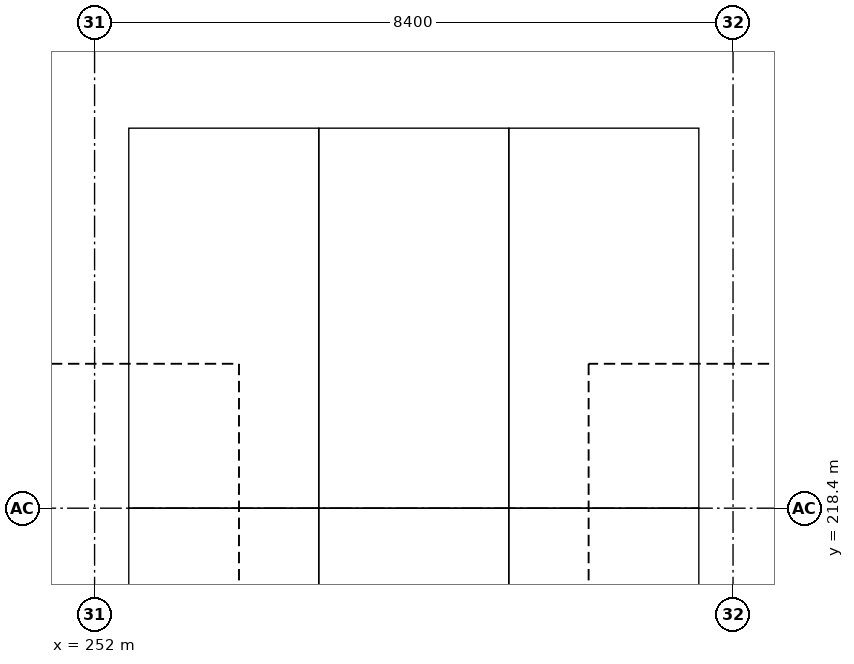
"""IFC4 building model, lengths in metres.
Left out: names, types, materials, properties, quantities, classifications, styles, units other than length and angle.
Written with IfcOpenShell. Run it as: python <this file> out.ifc"""

import sys

from ifc_helpers import new_model, si_unit, direction, frame, origin, origin_2d, place, context, subcontext, project, spatial, rectangle, extrude, element, save


model = new_model("IFC4")
c1 = context("Model", 3, precision=1e-05, world=origin(), true_north=direction((0.0, 1.0)))
c2 = subcontext(c1, "Body", "Model", "MODEL_VIEW")
j1 = project(units=[si_unit("LENGTHUNIT", "METRE"), si_unit("PLANEANGLEUNIT", "RADIAN")], contexts=[c1])
p1 = place(None, origin())
s1 = spatial("IfcSite", under=j1, at=p1, CompositionType="ELEMENT")
p2 = place(p1, origin())
s2 = spatial("IfcBuilding", under=s1, at=p2, CompositionType="ELEMENT")
p3 = place(p2, frame((0.0, 0.0, -3.0)))
s3 = spatial("IfcBuildingStorey", under=s2, at=p3, CompositionType="ELEMENT", Elevation=-3.0)
for number, where, z_axis, x_axis in (
    (1, (252.0, 218.4, 0.0), (0.0, 0.0, 1.0), (1.0, 0.0, 0.0)),
    (2, (260.4, 218.4, 0.0), (0.0, 0.0, 1.0), (1.0, 0.0, 0.0)),
):
    element("IfcColumn", number, at=place(p3, frame(where, z_axis=z_axis, x_axis=x_axis)), inside=s3, PredefinedType="COLUMN", context=c2, shape_type="SweptSolid", body=[
        extrude(rectangle(XDim=0.8, YDim=0.8, at=origin_2d()), origin(), (0.0, 0.0, 1.0), 2.4),
    ])
save(model, sys.argv[1])
